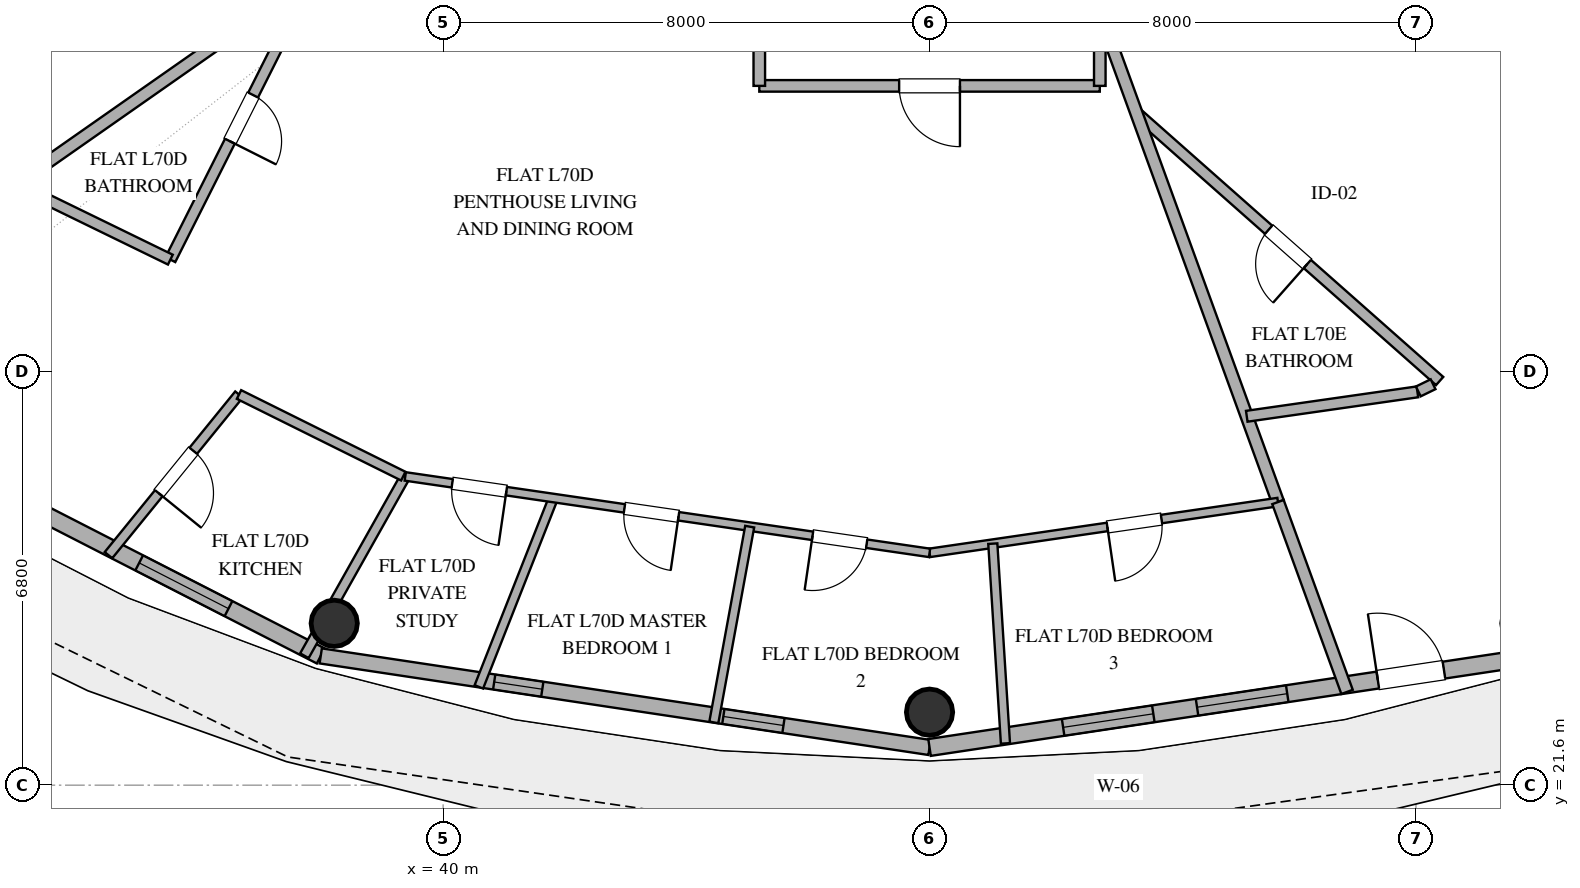
"""IFC4 building model, lengths in metres.
Left out: names, types, materials, properties, quantities, classifications, styles, units other than length and angle.
Written with IfcOpenShell. Run it as: python <this file> out.ifc"""

import sys

from ifc_helpers import new_model, si_unit, direction, frame, frame_2d, origin, origin_2d, place, context, subcontext, project, spatial, rectangle, hollow_circle, extrude, element, fill, save


model = new_model("IFC4")
c1 = context("Model", 3, precision=1e-05, world=origin(), true_north=direction((0.0, 1.0)))
c2 = subcontext(c1, "Body", "Model", "MODEL_VIEW")
j1 = project(units=[si_unit("LENGTHUNIT", "METRE"), si_unit("PLANEANGLEUNIT", "RADIAN")], contexts=[c1])
p1 = place(None, origin())
s1 = spatial("IfcSite", under=j1, at=p1, CompositionType="ELEMENT")
p2 = place(p1, origin())
s2 = spatial("IfcBuilding", under=s1, at=p2, CompositionType="ELEMENT")
p3 = place(p2, frame((0.0, 0.0, 273.0)))
s3 = spatial("IfcBuildingStorey", under=s2, at=p3, CompositionType="ELEMENT", Elevation=273.0)
for number, where, z_axis, x_axis in (
    (1, (38.209, 24.261, 0.0), (0.0, 0.0, 1.0), (1.0, 0.0, 0.0)),
    (2, (48.0, 22.8, 0.0), (0.0, 0.0, 1.0), (1.0, 0.0, 0.0)),
):
    element("IfcColumn", number, at=place(p3, frame(where, z_axis=z_axis, x_axis=x_axis)), inside=s3, PredefinedType="COLUMN", context=c2, shape_type="SweptSolid", body=[
        extrude(hollow_circle(Radius=0.381, WallThickness=0.025, at=origin_2d()), origin(), (0.0, 0.0, 1.0), 3.37),
    ])
p4 = place(p3, frame((29.617, 28.013, 0.0), z_axis=(0.0, 0.0, 1.0), x_axis=(0.890007394051, -0.455946091699, 0.0)))
e3 = element("IfcWall", 3, at=p4, inside=s3, PredefinedType="SOLIDWALL", context=c2, shape_type="SweptSolid", body=[
    extrude(rectangle(XDim=9.404, YDim=0.28, at=frame_2d((4.702, 0.0))), origin(), (0.0, 0.0, 1.0), 3.37),
])
p5 = place(p4, frame((2.533, 0.0, 0.85)))
e4 = element("IfcOpeningElement", 4, at=p5, cuts=e3, PredefinedType="OPENING", context=c2, shape_type="SweptSolid", body=[
    extrude(rectangle(XDim=1.8, YDim=2.2, at=frame_2d((0.9, 1.1))), frame((0.0, 0.15, 0.0), z_axis=(0.0, -1.0, 0.0), x_axis=(1.0, 0.0, 0.0)), (0.0, 0.0, 1.0), 0.3),
])
p6 = place(p4, frame((6.049, 0.0, 0.85)))
e5 = element("IfcOpeningElement", 5, at=p6, cuts=e3, PredefinedType="OPENING", context=c2, shape_type="SweptSolid", body=[
    extrude(rectangle(XDim=1.65, YDim=2.0, at=frame_2d((0.825, 1.0))), frame((0.0, 0.15, 0.0), z_axis=(0.0, -1.0, 0.0), x_axis=(1.0, 0.0, 0.0)), (0.0, 0.0, 1.0), 0.3),
])
p7 = place(p3, frame((37.987, 23.726, 0.0), z_axis=(0.0, 0.0, 1.0), x_axis=(0.988882522213, -0.148698881169, 0.0)))
e6 = element("IfcWall", 6, at=p7, inside=s3, PredefinedType="SOLIDWALL", context=c2, shape_type="SweptSolid", body=[
    extrude(rectangle(XDim=10.125, YDim=0.25, at=frame_2d((5.062, 0.0))), origin(), (0.0, 0.0, 1.0), 3.37),
])
p8 = place(p7, frame((2.885, 0.0, 1.54)))
e7 = element("IfcOpeningElement", 7, at=p8, cuts=e6, PredefinedType="OPENING", context=c2, shape_type="SweptSolid", body=[
    extrude(rectangle(XDim=0.8, YDim=1.0, at=frame_2d((0.4, 0.5))), frame((0.0, 0.135, 0.0), z_axis=(0.0, -1.0, 0.0), x_axis=(1.0, 0.0, 0.0)), (0.0, 0.0, 1.0), 0.27),
])
p9 = place(p7, frame((6.696, 0.0, 0.35)))
e8 = element("IfcOpeningElement", 8, at=p9, cuts=e6, PredefinedType="OPENING", context=c2, shape_type="SweptSolid", body=[
    extrude(rectangle(XDim=1.0, YDim=1.05, at=frame_2d((0.5, 0.525))), frame((0.0, 0.135, 0.0), z_axis=(0.0, -1.0, 0.0), x_axis=(1.0, 0.0, 0.0)), (0.0, 0.0, 1.0), 0.27),
])
p10 = place(p3, frame((48.0, 22.22, 0.0), z_axis=(0.0, 0.0, 1.0), x_axis=(0.988882522213, 0.148698881169, 0.0)))
e9 = element("IfcWall", 9, at=p10, inside=s3, PredefinedType="SOLIDWALL", context=c2, shape_type="SweptSolid", body=[
    extrude(rectangle(XDim=10.125, YDim=0.28, at=frame_2d((5.062, 0.0))), origin(), (0.0, 0.0, 1.0), 3.37),
])
p11 = place(p10, frame((2.222, 0.0, 0.85)))
e10 = element("IfcOpeningElement", 10, at=p11, cuts=e9, PredefinedType="OPENING", context=c2, shape_type="SweptSolid", body=[
    extrude(rectangle(XDim=1.5, YDim=2.0, at=frame_2d((0.75, 1.0))), frame((0.0, 0.15, 0.0), z_axis=(0.0, -1.0, 0.0), x_axis=(1.0, 0.0, 0.0)), (0.0, 0.0, 1.0), 0.3),
])
p12 = place(p10, frame((4.449, 0.0, 0.85)))
e11 = element("IfcOpeningElement", 11, at=p12, cuts=e9, PredefinedType="OPENING", context=c2, shape_type="SweptSolid", body=[
    extrude(rectangle(XDim=1.5, YDim=2.0, at=frame_2d((0.75, 1.0))), frame((0.0, 0.15, 0.0), z_axis=(0.0, -1.0, 0.0), x_axis=(1.0, 0.0, 0.0)), (0.0, 0.0, 1.0), 0.3),
])
p13 = place(p10, frame((7.456, 0.0, 0.0)))
e12 = element("IfcOpeningElement", 12, at=p13, cuts=e9, PredefinedType="OPENING", context=c2, shape_type="SweptSolid", body=[
    extrude(rectangle(XDim=1.1, YDim=2.25, at=frame_2d((0.55, 1.125))), frame((0.0, 0.15, 0.0), z_axis=(0.0, -1.0, 0.0), x_axis=(1.0, 0.0, 0.0)), (0.0, 0.0, 1.0), 0.3),
])
p14 = place(p3, frame((56.389, 28.246, 0.0), z_axis=(0.0, 0.0, 1.0), x_axis=(-0.749087509224, 0.662471058632, 0.0)))
e13 = element("IfcWall", 13, at=p14, inside=s3, PredefinedType="PLUMBINGWALL", context=c2, shape_type="SweptSolid", body=[
    extrude(rectangle(XDim=6.66, YDim=0.18, at=frame_2d((3.33, 0.0))), origin(), (0.0, 0.0, 1.0), 2.73),
])
p15 = place(p14, frame((2.905, 0.0, 0.0)))
e14 = element("IfcOpeningElement", 14, at=p15, cuts=e13, PredefinedType="OPENING", context=c2, shape_type="SweptSolid", body=[
    extrude(rectangle(XDim=0.85, YDim=2.1, at=frame_2d((0.425, 1.05))), frame((0.0, 0.1, 0.0), z_axis=(0.0, -1.0, 0.0), x_axis=(1.0, 0.0, 0.0)), (0.0, 0.0, 1.0), 0.2),
])
p16 = place(p3, frame((50.8, 33.1, 0.0), z_axis=(0.0, 0.0, 1.0), x_axis=(-1.0, 0.0, 0.0)))
e15 = element("IfcWall", 15, at=p16, inside=s3, PredefinedType="PARTITIONING", context=c2, shape_type="SweptSolid", body=[
    extrude(rectangle(XDim=5.6, YDim=0.19, at=frame_2d((2.8, 0.0))), origin(), (0.0, 0.0, 1.0), 2.73),
])
p17 = place(p16, frame((2.3, 0.0, 0.0)))
e16 = element("IfcOpeningElement", 16, at=p17, cuts=e15, PredefinedType="OPENING", context=c2, shape_type="SweptSolid", body=[
    extrude(rectangle(XDim=1.0, YDim=2.2, at=frame_2d((0.5, 1.1))), frame((0.0, 0.105, 0.0), z_axis=(0.0, -1.0, 0.0), x_axis=(1.0, 0.0, 0.0)), (0.0, 0.0, 1.0), 0.21),
])
p18 = place(p3, frame((50.8, 34.307, 0.0), z_axis=(0.0, 0.0, 1.0), x_axis=(0.342010724278, -0.939696048985, 0.0)))
e17 = element("IfcWall", 17, at=p18, inside=s3, PredefinedType="PARTITIONING", context=c2, shape_type="SweptSolid", body=[
    extrude(rectangle(XDim=8.568, YDim=0.2, at=frame_2d((4.284, 0.0))), origin(), (0.0, 0.0, 1.0), 2.73),
])
p19 = place(p3, frame((37.855, 34.896, 0.0), z_axis=(0.0, 0.0, 1.0), x_axis=(-0.449274589412, -0.893393722447, 0.0)))
e18 = element("IfcWall", 18, at=p19, inside=s3, PredefinedType="PLUMBINGWALL", context=c2, shape_type="SweptSolid", body=[
    extrude(rectangle(XDim=5.209, YDim=0.18, at=frame_2d((2.604, 0.0))), origin(), (0.0, 0.0, 1.0), 2.73),
])
p20 = place(p19, frame((2.18, 0.0, 0.0)))
e19 = element("IfcOpeningElement", 19, at=p20, cuts=e18, PredefinedType="OPENING", context=c2, shape_type="SweptSolid", body=[
    extrude(rectangle(XDim=0.85, YDim=2.1, at=frame_2d((0.425, 1.05))), frame((0.0, 0.1, 0.0), z_axis=(0.0, -1.0, 0.0), x_axis=(1.0, 0.0, 0.0)), (0.0, 0.0, 1.0), 0.2),
])
p21 = place(p3, frame((36.575, 34.0, 0.0), z_axis=(0.0, 0.0, 1.0), x_axis=(-0.819138444565, -0.57359585828, 0.0)))
e20 = element("IfcWall", 20, at=p21, inside=s3, PredefinedType="PARTITIONING", context=c2, shape_type="SweptSolid", body=[
    extrude(rectangle(XDim=9.326, YDim=0.2, at=frame_2d((4.663, 0.0))), origin(), (0.0, 0.0, 1.0), 2.73),
])
p22 = place(p3, frame((53.73, 26.256, 0.0), z_axis=(0.0, 0.0, 1.0), x_axis=(-0.989539000253, -0.144265612597, 0.0)))
e21 = element("IfcWall", 21, at=p22, inside=s3, PredefinedType="PARTITIONING", context=c2, shape_type="SweptSolid", body=[
    extrude(rectangle(XDim=5.791, YDim=0.14, at=frame_2d((2.896, 0.0))), origin(), (0.0, 0.0, 1.0), 2.73),
])
p23 = place(p22, frame((1.936, 0.0, 0.0)))
e22 = element("IfcOpeningElement", 22, at=p23, cuts=e21, PredefinedType="OPENING", context=c2, shape_type="SweptSolid", body=[
    extrude(rectangle(XDim=0.9, YDim=2.1, at=frame_2d((0.45, 1.05))), frame((0.0, 0.08, 0.0), z_axis=(0.0, -1.0, 0.0), x_axis=(1.0, 0.0, 0.0)), (0.0, 0.0, 1.0), 0.16),
])
p24 = place(p3, frame((36.643, 28.024, 0.0), z_axis=(0.0, 0.0, 1.0), x_axis=(-0.630641219738, -0.776074514442, 0.0)))
e23 = element("IfcWall", 23, at=p24, inside=s3, PredefinedType="PLUMBINGWALL", context=c2, shape_type="SweptSolid", body=[
    extrude(rectangle(XDim=3.405, YDim=0.16, at=frame_2d((1.702, 0.0))), origin(), (0.0, 0.0, 1.0), 2.73),
])
p25 = place(p24, frame((1.192, 0.0, 0.0)))
e24 = element("IfcOpeningElement", 24, at=p25, cuts=e23, PredefinedType="OPENING", context=c2, shape_type="SweptSolid", body=[
    extrude(rectangle(XDim=0.9, YDim=2.1, at=frame_2d((0.45, 1.05))), frame((0.0, 0.09, 0.0), z_axis=(0.0, -1.0, 0.0), x_axis=(1.0, 0.0, 0.0)), (0.0, 0.0, 1.0), 0.18),
])
p26 = place(p3, frame((37.719, 23.729, 0.0), z_axis=(0.0, 0.0, 1.0), x_axis=(0.490408553136, 0.871492656889, 0.0)))
e25 = element("IfcWall", 25, at=p26, inside=s3, PredefinedType="PLUMBINGWALL", context=c2, shape_type="SweptSolid", body=[
    extrude(rectangle(XDim=3.383, YDim=0.16, at=frame_2d((1.692, 0.0))), origin(), (0.0, 0.0, 1.0), 2.73),
])
p27 = place(p3, frame((41.813, 26.322, 0.0), z_axis=(0.0, 0.0, 1.0), x_axis=(-0.366986730156, -0.930226176738, 0.0)))
e26 = element("IfcWall", 26, at=p27, inside=s3, PredefinedType="PARTITIONING", context=c2, shape_type="SweptSolid", body=[
    extrude(rectangle(XDim=3.339, YDim=0.15, at=frame_2d((1.669, 0.0))), origin(), (0.0, 0.0, 1.0), 2.73),
])
p28 = place(p3, frame((48.0, 25.42, 0.0), z_axis=(0.0, 0.0, 1.0), x_axis=(-0.989534564718, 0.144296033307, 0.0)))
e27 = element("IfcWall", 27, at=p28, inside=s3, PredefinedType="PARTITIONING", context=c2, shape_type="SweptSolid", body=[
    extrude(rectangle(XDim=8.714, YDim=0.14, at=frame_2d((4.357, 0.0))), origin(), (0.0, 0.0, 1.0), 2.73),
])
p29 = place(p28, frame((4.171, 0.0, 0.0)))
e28 = element("IfcOpeningElement", 28, at=p29, cuts=e27, PredefinedType="OPENING", context=c2, shape_type="SweptSolid", body=[
    extrude(rectangle(XDim=0.9, YDim=2.1, at=frame_2d((0.45, 1.05))), frame((0.0, 0.08, 0.0), z_axis=(0.0, -1.0, 0.0), x_axis=(1.0, 0.0, 0.0)), (0.0, 0.0, 1.0), 0.16),
])
p30 = place(p28, frame((1.045, 0.0, 0.0)))
e29 = element("IfcOpeningElement", 29, at=p30, cuts=e27, PredefinedType="OPENING", context=c2, shape_type="SweptSolid", body=[
    extrude(rectangle(XDim=0.9, YDim=2.1, at=frame_2d((0.45, 1.05))), frame((0.0, 0.08, 0.0), z_axis=(0.0, -1.0, 0.0), x_axis=(1.0, 0.0, 0.0)), (0.0, 0.0, 1.0), 0.16),
])
p31 = place(p28, frame((7.033, 0.0, 0.0)))
e30 = element("IfcOpeningElement", 30, at=p31, cuts=e27, PredefinedType="OPENING", context=c2, shape_type="SweptSolid", body=[
    extrude(rectangle(XDim=0.9, YDim=2.1, at=frame_2d((0.45, 1.05))), frame((0.0, 0.08, 0.0), z_axis=(0.0, -1.0, 0.0), x_axis=(1.0, 0.0, 0.0)), (0.0, 0.0, 1.0), 0.16),
])
p32 = place(p3, frame((53.73, 26.256, 0.0), z_axis=(0.0, 0.0, 1.0), x_axis=(0.341990855898, -0.939703280021, 0.0)))
e31 = element("IfcWall", 31, at=p32, inside=s3, PredefinedType="PARTITIONING", context=c2, shape_type="SweptSolid", body=[
    extrude(rectangle(XDim=3.323, YDim=0.2, at=frame_2d((1.661, 0.0))), origin(), (0.0, 0.0, 1.0), 2.73),
])
p33 = place(p3, frame((49.04, 25.572, 0.0), z_axis=(0.0, 0.0, 1.0), x_axis=(0.063195614113, -0.998001159497, 0.0)))
e32 = element("IfcWall", 32, at=p33, inside=s3, PredefinedType="PARTITIONING", context=c2, shape_type="SweptSolid", body=[
    extrude(rectangle(XDim=3.292, YDim=0.15, at=frame_2d((1.646, 0.0))), origin(), (0.0, 0.0, 1.0), 2.73),
])
p34 = place(p3, frame((44.452, 22.632, 0.0), z_axis=(0.0, 0.0, 1.0), x_axis=(0.180152248802, 0.983638738182, 0.0)))
e33 = element("IfcWall", 33, at=p34, inside=s3, PredefinedType="PARTITIONING", context=c2, shape_type="SweptSolid", body=[
    extrude(rectangle(XDim=3.273, YDim=0.15, at=frame_2d((1.636, 0.0))), origin(), (0.0, 0.0, 1.0), 2.73),
])
p35 = place(p3, frame((39.345, 26.682, 0.0), z_axis=(0.0, 0.0, 1.0), x_axis=(-0.895589359885, 0.44488166793, 0.0)))
e34 = element("IfcWall", 34, at=p35, inside=s3, PredefinedType="PLUMBINGWALL", context=c2, shape_type="SweptSolid", body=[
    extrude(rectangle(XDim=3.017, YDim=0.16, at=frame_2d((1.509, 0.0))), origin(), (0.0, 0.0, 1.0), 2.73),
])
p36 = place(p3, frame((53.217, 27.666, 0.0), z_axis=(0.0, 0.0, 1.0), x_axis=(0.989918473044, 0.141638330709, 0.0)))
e35 = element("IfcWall", 35, at=p36, inside=s3, PredefinedType="PLUMBINGWALL", context=c2, shape_type="SweptSolid", body=[
    extrude(rectangle(XDim=2.835, YDim=0.18, at=frame_2d((1.418, 0.0))), origin(), (0.0, 0.0, 1.0), 2.73),
])
p37 = place(p3, frame((35.514, 30.242, 0.0), z_axis=(0.0, 0.0, 1.0), x_axis=(-0.898915857852, 0.438121307975, 0.0)))
e36 = element("IfcWall", 36, at=p37, inside=s3, PredefinedType="PLUMBINGWALL", context=c2, shape_type="SweptSolid", body=[
    extrude(rectangle(XDim=2.498, YDim=0.18, at=frame_2d((1.249, 0.0))), origin(), (0.0, 0.0, 1.0), 2.73),
])
for number, where, z_axis, x_axis in (
    (37, (45.2, 33.1, 0.0), (0.0, 0.0, 1.0), (0.0, 1.0, 0.0)),
    (38, (50.8, 35.2, 0.0), (0.0, 0.0, 1.0), (0.0, -1.0, 0.0)),
):
    element("IfcWall", number, at=place(p3, frame(where, z_axis=z_axis, x_axis=x_axis)), inside=s3, PredefinedType="PARTITIONING", context=c2, shape_type="SweptSolid", body=[
        extrude(rectangle(XDim=2.1, YDim=0.19, at=frame_2d((1.05, 0.0))), origin(), (0.0, 0.0, 1.0), 2.73),
    ])
p38 = place(p3, frame((56.038, 28.075, 0.0), z_axis=(0.0, 0.0, 1.0), x_axis=(0.899071871525, 0.437801061937, 0.0)))
e39 = element("IfcWall", 39, at=p38, inside=s3, PredefinedType="PLUMBINGWALL", context=c2, shape_type="SweptSolid", body=[
    extrude(rectangle(XDim=0.271, YDim=0.18, at=frame_2d((0.135, 0.0))), origin(), (0.0, 0.0, 1.0), 2.73),
])
p39 = place(p6, origin())
e40 = element("IfcWindow", 40, at=p39, inside=s3, PartitioningType="SINGLE_PANEL", PredefinedType="WINDOW", context=c2, shape_type="SweptSolid", body=[
    extrude(rectangle(XDim=1.65, YDim=2.0, at=frame_2d((0.825, 1.0))), frame((0.0, 0.03, 0.0), z_axis=(0.0, -1.0, 0.0), x_axis=(1.0, 0.0, 0.0)), (0.0, 0.0, 1.0), 0.06),
])
fill(e5, e40)
p40 = place(p11, origin())
e41 = element("IfcWindow", 41, at=p40, inside=s3, PartitioningType="SINGLE_PANEL", PredefinedType="WINDOW", context=c2, shape_type="SweptSolid", body=[
    extrude(rectangle(XDim=1.5, YDim=2.0, at=frame_2d((0.75, 1.0))), frame((0.0, 0.03, 0.0), z_axis=(0.0, -1.0, 0.0), x_axis=(1.0, 0.0, 0.0)), (0.0, 0.0, 1.0), 0.06),
])
fill(e10, e41)
p41 = place(p12, origin())
e42 = element("IfcWindow", 42, at=p41, inside=s3, PartitioningType="SINGLE_PANEL", PredefinedType="WINDOW", context=c2, shape_type="SweptSolid", body=[
    extrude(rectangle(XDim=1.5, YDim=2.0, at=frame_2d((0.75, 1.0))), frame((0.0, 0.03, 0.0), z_axis=(0.0, -1.0, 0.0), x_axis=(1.0, 0.0, 0.0)), (0.0, 0.0, 1.0), 0.06),
])
fill(e11, e42)
p42 = place(p13, origin())
e43 = element("IfcDoor", 43, at=p42, inside=s3, OperationType="SINGLE_SWING_LEFT", PredefinedType="DOOR", context=c2, shape_type="SweptSolid", body=[
    extrude(rectangle(XDim=1.1, YDim=2.25, at=frame_2d((0.55, 1.125))), frame((0.0, 0.025, 0.0), z_axis=(0.0, -1.0, 0.0), x_axis=(1.0, 0.0, 0.0)), (0.0, 0.0, 1.0), 0.05),
])
fill(e12, e43)
p43 = place(p8, origin())
e44 = element("IfcWindow", 44, at=p43, inside=s3, PartitioningType="SINGLE_PANEL", PredefinedType="WINDOW", context=c2, shape_type="SweptSolid", body=[
    extrude(rectangle(XDim=0.8, YDim=1.0, at=frame_2d((0.4, 0.5))), frame((0.0, 0.03, 0.0), z_axis=(0.0, -1.0, 0.0), x_axis=(1.0, 0.0, 0.0)), (0.0, 0.0, 1.0), 0.06),
])
fill(e7, e44)
p44 = place(p9, origin())
e45 = element("IfcWindow", 45, at=p44, inside=s3, PartitioningType="SINGLE_PANEL", PredefinedType="WINDOW", context=c2, shape_type="SweptSolid", body=[
    extrude(rectangle(XDim=1.0, YDim=1.05, at=frame_2d((0.5, 0.525))), frame((0.0, 0.03, 0.0), z_axis=(0.0, -1.0, 0.0), x_axis=(1.0, 0.0, 0.0)), (0.0, 0.0, 1.0), 0.06),
])
fill(e8, e45)
p45 = place(p15, origin())
e46 = element("IfcDoor", 46, at=p45, inside=s3, OperationType="SINGLE_SWING_LEFT", PredefinedType="DOOR", context=c2, shape_type="SweptSolid", body=[
    extrude(rectangle(XDim=0.85, YDim=2.1, at=frame_2d((0.425, 1.05))), frame((0.0, 0.025, 0.0), z_axis=(0.0, -1.0, 0.0), x_axis=(1.0, 0.0, 0.0)), (0.0, 0.0, 1.0), 0.05),
])
fill(e14, e46)
p46 = place(p17, origin())
e47 = element("IfcDoor", 47, at=p46, inside=s3, OperationType="SINGLE_SWING_LEFT", PredefinedType="DOOR", context=c2, shape_type="SweptSolid", body=[
    extrude(rectangle(XDim=1.0, YDim=2.2, at=frame_2d((0.5, 1.1))), frame((0.0, 0.025, 0.0), z_axis=(0.0, -1.0, 0.0), x_axis=(1.0, 0.0, 0.0)), (0.0, 0.0, 1.0), 0.05),
])
fill(e16, e47)
p47 = place(p20, origin())
e48 = element("IfcDoor", 48, at=p47, inside=s3, OperationType="SINGLE_SWING_RIGHT", PredefinedType="DOOR", context=c2, shape_type="SweptSolid", body=[
    extrude(rectangle(XDim=0.85, YDim=2.1, at=frame_2d((0.425, 1.05))), frame((0.0, 0.025, 0.0), z_axis=(0.0, -1.0, 0.0), x_axis=(1.0, 0.0, 0.0)), (0.0, 0.0, 1.0), 0.05),
])
fill(e19, e48)
p48 = place(p23, origin())
e49 = element("IfcDoor", 49, at=p48, inside=s3, OperationType="SINGLE_SWING_RIGHT", PredefinedType="DOOR", context=c2, shape_type="SweptSolid", body=[
    extrude(rectangle(XDim=0.9, YDim=2.1, at=frame_2d((0.45, 1.05))), frame((0.0, 0.025, 0.0), z_axis=(0.0, -1.0, 0.0), x_axis=(1.0, 0.0, 0.0)), (0.0, 0.0, 1.0), 0.05),
])
fill(e22, e49)
p49 = place(p25, origin())
e50 = element("IfcDoor", 50, at=p49, inside=s3, OperationType="SINGLE_SWING_RIGHT", PredefinedType="DOOR", context=c2, shape_type="SweptSolid", body=[
    extrude(rectangle(XDim=0.9, YDim=2.1, at=frame_2d((0.45, 1.05))), frame((0.0, 0.025, 0.0), z_axis=(0.0, -1.0, 0.0), x_axis=(1.0, 0.0, 0.0)), (0.0, 0.0, 1.0), 0.05),
])
fill(e24, e50)
p50 = place(p29, origin())
e51 = element("IfcDoor", 51, at=p50, inside=s3, OperationType="SINGLE_SWING_LEFT", PredefinedType="DOOR", context=c2, shape_type="SweptSolid", body=[
    extrude(rectangle(XDim=0.9, YDim=2.1, at=frame_2d((0.45, 1.05))), frame((0.0, 0.025, 0.0), z_axis=(0.0, -1.0, 0.0), x_axis=(1.0, 0.0, 0.0)), (0.0, 0.0, 1.0), 0.05),
])
fill(e28, e51)
p51 = place(p30, origin())
e52 = element("IfcDoor", 52, at=p51, inside=s3, OperationType="SINGLE_SWING_RIGHT", PredefinedType="DOOR", context=c2, shape_type="SweptSolid", body=[
    extrude(rectangle(XDim=0.9, YDim=2.1, at=frame_2d((0.45, 1.05))), frame((0.0, 0.025, 0.0), z_axis=(0.0, -1.0, 0.0), x_axis=(1.0, 0.0, 0.0)), (0.0, 0.0, 1.0), 0.05),
])
fill(e29, e52)
p52 = place(p31, origin())
e53 = element("IfcDoor", 53, at=p52, inside=s3, OperationType="SINGLE_SWING_LEFT", PredefinedType="DOOR", context=c2, shape_type="SweptSolid", body=[
    extrude(rectangle(XDim=0.9, YDim=2.1, at=frame_2d((0.45, 1.05))), frame((0.0, 0.025, 0.0), z_axis=(0.0, -1.0, 0.0), x_axis=(1.0, 0.0, 0.0)), (0.0, 0.0, 1.0), 0.05),
])
fill(e30, e53)
save(model, sys.argv[1])
